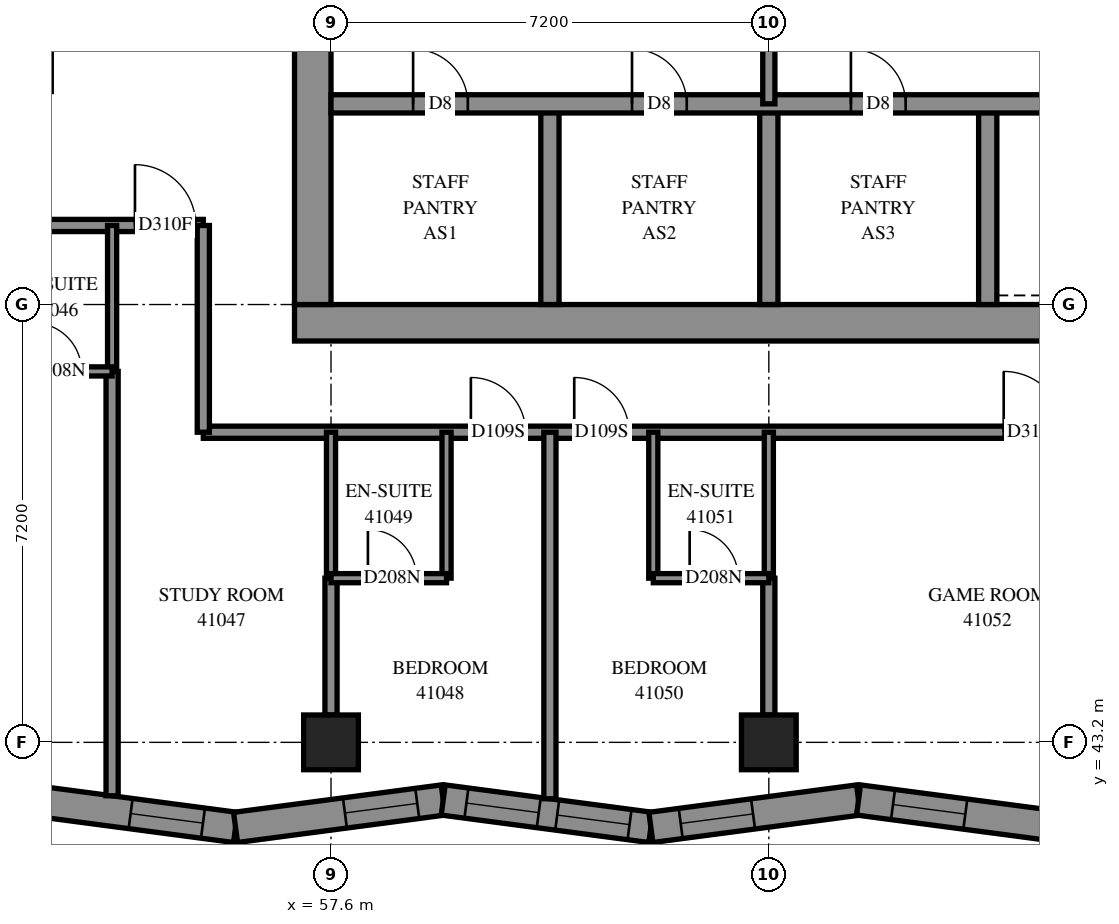
"""IFC4 building model, lengths in metres.
Left out: names, types, materials, properties, quantities, classifications, styles, units other than length and angle.
Written with IfcOpenShell. Run it as: python <this file> out.ifc"""

import sys

from ifc_helpers import new_model, si_unit, direction, frame, frame_2d, origin, origin_2d, place, context, subcontext, project, spatial, polyline, rectangle, outline, extrude, element, fill, save


model = new_model("IFC4")
c1 = context("Model", 3, precision=1e-05, world=origin(), true_north=direction((0.0, 1.0)))
c2 = subcontext(c1, "Body", "Model", "MODEL_VIEW")
j1 = project(units=[si_unit("LENGTHUNIT", "METRE"), si_unit("PLANEANGLEUNIT", "RADIAN")], contexts=[c1])
p1 = place(None, origin())
s1 = spatial("IfcSite", under=j1, at=p1, CompositionType="ELEMENT")
p2 = place(p1, origin())
s2 = spatial("IfcBuilding", under=s1, at=p2, CompositionType="ELEMENT")
p3 = place(p2, frame((0.0, 0.0, 152.4)))
s3 = spatial("IfcBuildingStorey", under=s2, at=p3, CompositionType="ELEMENT", Elevation=152.4)
for number, where, z_axis, x_axis in (
    (1, (57.6, 43.2, 0.0), (0.0, 0.0, 1.0), (1.0, 0.0, 0.0)),
    (2, (64.8, 43.2, 0.0), (0.0, 0.0, 1.0), (1.0, 0.0, 0.0)),
):
    element("IfcColumn", number, at=place(p3, frame(where, z_axis=z_axis, x_axis=x_axis)), inside=s3, PredefinedType="COLUMN", context=c2, shape_type="SweptSolid", body=[
        extrude(rectangle(XDim=0.9, YDim=0.9, at=origin_2d()), origin(), (0.0, 0.0, 1.0), 3.1),
    ])
p4 = place(p3, frame((57.0, 50.1, -0.3), z_axis=(0.0, 0.0, 1.0), x_axis=(1.0, 0.0, 0.0)))
e3 = element("IfcWall", 3, at=p4, inside=s3, PredefinedType="SHEAR", context=c2, shape_type="SweptSolid", body=[
    extrude(rectangle(XDim=15.6, YDim=0.6, at=frame_2d((7.8, 0.0))), origin(), (0.0, 0.0, 1.0), 2.7),
])
p5 = place(p3, frame((57.3, 50.4, -0.3), z_axis=(0.0, 0.0, 1.0), x_axis=(0.0, 1.0, 0.0)))
e4 = element("IfcWall", 4, at=p5, inside=s3, PredefinedType="SHEAR", context=c2, shape_type="SweptSolid", body=[
    extrude(rectangle(XDim=14.4, YDim=0.6, at=frame_2d((7.2, 0.0))), origin(), (0.0, 0.0, 1.0), 2.7),
])
p6 = place(p5, frame((4.55, 0.0, 0.3)))
e5 = element("IfcOpeningElement", 5, at=p6, cuts=e4, PredefinedType="OPENING", context=c2, shape_type="SweptSolid", body=[
    extrude(rectangle(XDim=1.1, YDim=2.1, at=frame_2d((0.55, 1.05))), frame((0.0, 0.31, 0.0), z_axis=(0.0, -1.0, 0.0), x_axis=(1.0, 0.0, 0.0)), (0.0, 0.0, 1.0), 0.62),
])
p7 = place(p5, frame((11.35, 0.0, 0.3)))
e6 = element("IfcOpeningElement", 6, at=p7, cuts=e4, PredefinedType="OPENING", context=c2, shape_type="SweptSolid", body=[
    extrude(rectangle(XDim=1.1, YDim=2.1, at=frame_2d((0.55, 1.05))), frame((0.0, 0.31, 0.0), z_axis=(0.0, -1.0, 0.0), x_axis=(1.0, 0.0, 0.0)), (0.0, 0.0, 1.0), 0.62),
])
for number, where, z_axis, x_axis in (
    (7, (61.2, 50.4, 0.0), (0.0, 0.0, 1.0), (0.0, 1.0, 0.0)),
    (8, (64.8, 50.4, 0.0), (0.0, 0.0, 1.0), (0.0, 1.0, 0.0)),
    (9, (68.4, 50.4, 0.0), (0.0, 0.0, 1.0), (0.0, 1.0, 0.0)),
):
    element("IfcWall", number, at=place(p3, frame(where, z_axis=z_axis, x_axis=x_axis)), inside=s3, PredefinedType="SOLIDWALL", context=c2, shape_type="SweptSolid", body=[
        extrude(rectangle(XDim=3.3, YDim=0.3, at=frame_2d((1.65, 0.0))), origin(), (0.0, 0.0, 1.0), 3.1),
    ])
p8 = place(p3, frame((57.6, 53.7, 0.0), z_axis=(0.0, 0.0, 1.0), x_axis=(1.0, 0.0, 0.0)))
e10 = element("IfcWall", 10, at=p8, inside=s3, PredefinedType="SOLIDWALL", context=c2, shape_type="SweptSolid", body=[
    extrude(rectangle(XDim=14.4, YDim=0.3, at=frame_2d((7.2, 0.0))), origin(), (0.0, 0.0, 1.0), 3.1),
])
p9 = place(p8, frame((1.35, 0.0, 0.0)))
e11 = element("IfcOpeningElement", 11, at=p9, cuts=e10, PredefinedType="OPENING", context=c2, shape_type="SweptSolid", body=[
    extrude(rectangle(XDim=0.9, YDim=2.1, at=frame_2d((0.45, 1.05))), frame((0.0, 0.16, 0.0), z_axis=(0.0, -1.0, 0.0), x_axis=(1.0, 0.0, 0.0)), (0.0, 0.0, 1.0), 0.32),
])
p10 = place(p8, frame((4.95, 0.0, 0.0)))
e12 = element("IfcOpeningElement", 12, at=p10, cuts=e10, PredefinedType="OPENING", context=c2, shape_type="SweptSolid", body=[
    extrude(rectangle(XDim=0.9, YDim=2.1, at=frame_2d((0.45, 1.05))), frame((0.0, 0.16, 0.0), z_axis=(0.0, -1.0, 0.0), x_axis=(1.0, 0.0, 0.0)), (0.0, 0.0, 1.0), 0.32),
])
p11 = place(p8, frame((8.55, 0.0, 0.0)))
e13 = element("IfcOpeningElement", 13, at=p11, cuts=e10, PredefinedType="OPENING", context=c2, shape_type="SweptSolid", body=[
    extrude(rectangle(XDim=0.9, YDim=2.1, at=frame_2d((0.45, 1.05))), frame((0.0, 0.16, 0.0), z_axis=(0.0, -1.0, 0.0), x_axis=(1.0, 0.0, 0.0)), (0.0, 0.0, 1.0), 0.32),
])
p12 = place(p8, frame((12.05, 0.0, 0.0)))
e14 = element("IfcOpeningElement", 14, at=p12, cuts=e10, PredefinedType="OPENING", context=c2, shape_type="SweptSolid", body=[
    extrude(rectangle(XDim=1.1, YDim=2.1, at=frame_2d((0.55, 1.05))), frame((0.0, 0.16, 0.0), z_axis=(0.0, -1.0, 0.0), x_axis=(1.0, 0.0, 0.0)), (0.0, 0.0, 1.0), 0.32),
])
p13 = place(p3, frame((52.594, 42.255, 0.0), z_axis=(0.0, 0.0, 1.0), x_axis=(0.9913929124, -0.1309201792, 0.0)))
e15 = element("IfcWall", 15, at=p13, inside=s3, PredefinedType="SOLIDWALL", context=c2, shape_type="SweptSolid", body=[
    extrude(outline(polyline([(0.055, -0.25), (3.499, -0.25), (3.433, 0.25), (-0.055, 0.25), (0.055, -0.25)])), origin(), (0.0, 0.0, 1.0), 3.1),
])
p14 = place(p13, frame((1.726, 0.0, 0.45)))
e16 = element("IfcOpeningElement", 16, at=p14, cuts=e15, PredefinedType="OPENING", context=c2, shape_type="SweptSolid", body=[
    extrude(rectangle(XDim=1.2, YDim=2.5, at=frame_2d((0.6, 1.25))), frame((0.0, 0.26, 0.0), z_axis=(0.0, -1.0, 0.0), x_axis=(1.0, 0.0, 0.0)), (0.0, 0.0, 1.0), 0.52),
])
p15 = place(p3, frame((56.03, 41.801, 0.0), z_axis=(0.0, 0.0, 1.0), x_axis=(0.9913924297, 0.1309238341, 0.0)))
e17 = element("IfcWall", 17, at=p15, inside=s3, PredefinedType="SOLIDWALL", context=c2, shape_type="SweptSolid", body=[
    extrude(outline(polyline([(-0.033, -0.25), (3.412, -0.25), (3.478, 0.25), (0.033, 0.25), (-0.033, -0.25)])), origin(), (0.0, 0.0, 1.0), 3.1),
])
p16 = place(p15, frame((1.814, 0.0, 0.45)))
e18 = element("IfcOpeningElement", 18, at=p16, cuts=e17, PredefinedType="OPENING", context=c2, shape_type="SweptSolid", body=[
    extrude(rectangle(XDim=1.2, YDim=2.5, at=frame_2d((0.6, 1.25))), frame((0.0, 0.26, 0.0), z_axis=(0.0, -1.0, 0.0), x_axis=(1.0, 0.0, 0.0)), (0.0, 0.0, 1.0), 0.52),
])
p17 = place(p3, frame((59.445, 42.252, 0.0), z_axis=(0.0, 0.0, 1.0), x_axis=(0.9913924297, -0.1309238341, 0.0)))
e19 = element("IfcWall", 19, at=p17, inside=s3, PredefinedType="SOLIDWALL", context=c2, shape_type="SweptSolid", body=[
    extrude(outline(polyline([(0.033, -0.25), (3.478, -0.25), (3.412, 0.25), (-0.033, 0.25), (0.033, -0.25)])), origin(), (0.0, 0.0, 1.0), 3.1),
])
p18 = place(p17, frame((0.385, 0.0, 0.45)))
e20 = element("IfcOpeningElement", 20, at=p18, cuts=e19, PredefinedType="OPENING", context=c2, shape_type="SweptSolid", body=[
    extrude(rectangle(XDim=1.2, YDim=2.5, at=frame_2d((0.6, 1.25))), frame((0.0, 0.26, 0.0), z_axis=(0.0, -1.0, 0.0), x_axis=(1.0, 0.0, 0.0)), (0.0, 0.0, 1.0), 0.52),
])
p19 = place(p17, frame((1.891, 0.0, 0.45)))
e21 = element("IfcOpeningElement", 21, at=p19, cuts=e19, PredefinedType="OPENING", context=c2, shape_type="SweptSolid", body=[
    extrude(rectangle(XDim=1.2, YDim=2.5, at=frame_2d((0.6, 1.25))), frame((0.0, 0.26, 0.0), z_axis=(0.0, -1.0, 0.0), x_axis=(1.0, 0.0, 0.0)), (0.0, 0.0, 1.0), 0.52),
])
p20 = place(p3, frame((62.86, 41.801, 0.0), z_axis=(0.0, 0.0, 1.0), x_axis=(0.9913924297, 0.1309238341, 0.0)))
e22 = element("IfcWall", 22, at=p20, inside=s3, PredefinedType="SOLIDWALL", context=c2, shape_type="SweptSolid", body=[
    extrude(outline(polyline([(-0.033, -0.25), (3.412, -0.25), (3.478, 0.25), (0.033, 0.25), (-0.033, -0.25)])), origin(), (0.0, 0.0, 1.0), 3.1),
])
p21 = place(p20, frame((0.495, 0.0, 0.45)))
e23 = element("IfcOpeningElement", 23, at=p21, cuts=e22, PredefinedType="OPENING", context=c2, shape_type="SweptSolid", body=[
    extrude(rectangle(XDim=1.2, YDim=2.5, at=frame_2d((0.6, 1.25))), frame((0.0, 0.26, 0.0), z_axis=(0.0, -1.0, 0.0), x_axis=(1.0, 0.0, 0.0)), (0.0, 0.0, 1.0), 0.52),
])
p22 = place(p3, frame((66.275, 42.252, 0.0), z_axis=(0.0, 0.0, 1.0), x_axis=(0.9913919321, -0.1309276022, 0.0)))
e24 = element("IfcWall", 24, at=p22, inside=s3, PredefinedType="SOLIDWALL", context=c2, shape_type="SweptSolid", body=[
    extrude(outline(polyline([(0.033, -0.25), (3.478, -0.25), (3.412, 0.25), (-0.033, 0.25), (0.033, -0.25)])), origin(), (0.0, 0.0, 1.0), 3.1),
])
p23 = place(p22, frame((0.572, 0.0, 0.45)))
e25 = element("IfcOpeningElement", 25, at=p23, cuts=e24, PredefinedType="OPENING", context=c2, shape_type="SweptSolid", body=[
    extrude(rectangle(XDim=1.2, YDim=2.5, at=frame_2d((0.6, 1.25))), frame((0.0, 0.26, 0.0), z_axis=(0.0, -1.0, 0.0), x_axis=(1.0, 0.0, 0.0)), (0.0, 0.0, 1.0), 0.52),
])
p24 = place(p3, frame((64.8, 53.7, 0.0), z_axis=(0.0, 0.0, 1.0), x_axis=(0.0, 1.0, 0.0)))
e26 = element("IfcWall", 26, at=p24, inside=s3, PredefinedType="PARTITIONING", context=c2, shape_type="SweptSolid", body=[
    extrude(rectangle(XDim=3.6, YDim=0.2, at=frame_2d((1.8, 0.0))), origin(), (0.0, 0.0, 1.0), 3.1),
])
p25 = place(p3, frame((55.5, 48.3, 0.0), z_axis=(0.0, 0.0, 1.0), x_axis=(1.0, 0.0, 0.0)))
e27 = element("IfcWall", 27, at=p25, inside=s3, PredefinedType="PARTITIONING", context=c2, shape_type="SweptSolid", body=[
    extrude(rectangle(XDim=18.974, YDim=0.2, at=frame_2d((9.487, 0.0))), origin(), (0.0, 0.0, 1.0), 3.1),
])
p26 = place(p25, frame((4.4, 0.0, 0.0)))
e28 = element("IfcOpeningElement", 28, at=p26, cuts=e27, PredefinedType="OPENING", context=c2, shape_type="SweptSolid", body=[
    extrude(rectangle(XDim=0.9, YDim=2.1, at=frame_2d((0.45, 1.05))), frame((0.0, 0.11, 0.0), z_axis=(0.0, -1.0, 0.0), x_axis=(1.0, 0.0, 0.0)), (0.0, 0.0, 1.0), 0.22),
])
p27 = place(p25, frame((6.1, 0.0, 0.0)))
e29 = element("IfcOpeningElement", 29, at=p27, cuts=e27, PredefinedType="OPENING", context=c2, shape_type="SweptSolid", body=[
    extrude(rectangle(XDim=0.9, YDim=2.1, at=frame_2d((0.45, 1.05))), frame((0.0, 0.11, 0.0), z_axis=(0.0, -1.0, 0.0), x_axis=(1.0, 0.0, 0.0)), (0.0, 0.0, 1.0), 0.22),
])
p28 = place(p25, frame((13.162, 0.0, 0.0)))
e30 = element("IfcOpeningElement", 30, at=p28, cuts=e27, PredefinedType="OPENING", context=c2, shape_type="SweptSolid", body=[
    extrude(rectangle(XDim=1.0, YDim=2.1, at=frame_2d((0.5, 1.05))), frame((0.0, 0.11, 0.0), z_axis=(0.0, -1.0, 0.0), x_axis=(1.0, 0.0, 0.0)), (0.0, 0.0, 1.0), 0.22),
])
p29 = place(p3, frame((54.0, 42.321, 0.0), z_axis=(0.0, 0.0, 1.0), x_axis=(0.0, 1.0, 0.0)))
e31 = element("IfcWall", 31, at=p29, inside=s3, PredefinedType="PARTITIONING", context=c2, shape_type="SweptSolid", body=[
    extrude(rectangle(XDim=6.979, YDim=0.2, at=frame_2d((3.489, 0.0))), origin(), (0.0, 0.0, 1.0), 3.1),
])
p30 = place(p3, frame((61.2, 42.273, 0.0), z_axis=(0.0, 0.0, 1.0), x_axis=(0.0, 1.0, 0.0)))
e32 = element("IfcWall", 32, at=p30, inside=s3, PredefinedType="PARTITIONING", context=c2, shape_type="SweptSolid", body=[
    extrude(rectangle(XDim=6.027, YDim=0.2, at=frame_2d((3.014, 0.0))), origin(), (0.0, 0.0, 1.0), 3.1),
])
p31 = place(p3, frame((50.4, 51.7, 0.0), z_axis=(0.0, 0.0, 1.0), x_axis=(1.0, 0.0, 0.0)))
e33 = element("IfcWall", 33, at=p31, inside=s3, PredefinedType="PARTITIONING", context=c2, shape_type="SweptSolid", body=[
    extrude(rectangle(XDim=5.1, YDim=0.2, at=frame_2d((2.55, 0.0))), origin(), (0.0, 0.0, 1.0), 3.1),
])
p32 = place(p31, frame((0.552, 0.0, 0.0)))
e34 = element("IfcOpeningElement", 34, at=p32, cuts=e33, PredefinedType="OPENING", context=c2, shape_type="SweptSolid", body=[
    extrude(rectangle(XDim=0.9, YDim=2.1, at=frame_2d((0.45, 1.05))), frame((0.0, 0.11, 0.0), z_axis=(0.0, -1.0, 0.0), x_axis=(1.0, 0.0, 0.0)), (0.0, 0.0, 1.0), 0.22),
])
p33 = place(p31, frame((3.976, 0.0, 0.0)))
e35 = element("IfcOpeningElement", 35, at=p33, cuts=e33, PredefinedType="OPENING", context=c2, shape_type="SweptSolid", body=[
    extrude(rectangle(XDim=1.0, YDim=2.1, at=frame_2d((0.5, 1.05))), frame((0.0, 0.11, 0.0), z_axis=(0.0, -1.0, 0.0), x_axis=(1.0, 0.0, 0.0)), (0.0, 0.0, 1.0), 0.22),
])
p34 = place(p3, frame((55.5, 48.3, 0.0), z_axis=(0.0, 0.0, 1.0), x_axis=(0.0, 1.0, 0.0)))
e36 = element("IfcWall", 36, at=p34, inside=s3, PredefinedType="PARTITIONING", context=c2, shape_type="SweptSolid", body=[
    extrude(rectangle(XDim=3.4, YDim=0.2, at=frame_2d((1.7, 0.0))), origin(), (0.0, 0.0, 1.0), 3.1),
])
for number, where, z_axis, x_axis in (
    (37, (54.0, 49.3, 0.0), (0.0, 0.0, 1.0), (0.0, 1.0, 0.0)),
    (38, (59.5, 45.9, 0.0), (0.0, 0.0, 1.0), (0.0, 1.0, 0.0)),
    (39, (57.6, 45.9, 0.0), (0.0, 0.0, 1.0), (0.0, 1.0, 0.0)),
    (40, (62.9, 45.9, 0.0), (0.0, 0.0, 1.0), (0.0, 1.0, 0.0)),
    (41, (64.8, 45.9, 0.0), (0.0, 0.0, 1.0), (0.0, 1.0, 0.0)),
):
    element("IfcWall", number, at=place(p3, frame(where, z_axis=z_axis, x_axis=x_axis)), inside=s3, PredefinedType="PARTITIONING", context=c2, shape_type="SweptSolid", body=[
        extrude(rectangle(XDim=2.4, YDim=0.15, at=frame_2d((1.2, 0.0))), origin(), (0.0, 0.0, 1.0), 3.1),
    ])
for number, where, z_axis, x_axis in (
    (42, (57.6, 43.65, 0.0), (0.0, 0.0, 1.0), (0.0, 1.0, 0.0)),
    (43, (64.8, 43.65, 0.0), (0.0, 0.0, 1.0), (0.0, 1.0, 0.0)),
):
    element("IfcWall", number, at=place(p3, frame(where, z_axis=z_axis, x_axis=x_axis)), inside=s3, PredefinedType="PARTITIONING", context=c2, shape_type="SweptSolid", body=[
        extrude(rectangle(XDim=2.25, YDim=0.2, at=frame_2d((1.125, 0.0))), origin(), (0.0, 0.0, 1.0), 3.1),
    ])
p35 = place(p3, frame((52.1, 49.3, 0.0), z_axis=(0.0, 0.0, 1.0), x_axis=(1.0, 0.0, 0.0)))
e44 = element("IfcWall", 44, at=p35, inside=s3, PredefinedType="PARTITIONING", context=c2, shape_type="SweptSolid", body=[
    extrude(rectangle(XDim=1.9, YDim=0.15, at=frame_2d((0.95, 0.0))), origin(), (0.0, 0.0, 1.0), 3.1),
])
p36 = place(p35, frame((0.598, 0.0, 0.0)))
e45 = element("IfcOpeningElement", 45, at=p36, cuts=e44, PredefinedType="OPENING", context=c2, shape_type="SweptSolid", body=[
    extrude(rectangle(XDim=0.8, YDim=2.1, at=frame_2d((0.4, 1.05))), frame((0.0, 0.085, 0.0), z_axis=(0.0, -1.0, 0.0), x_axis=(1.0, 0.0, 0.0)), (0.0, 0.0, 1.0), 0.17),
])
p37 = place(p3, frame((57.6, 45.9, 0.0), z_axis=(0.0, 0.0, 1.0), x_axis=(1.0, 0.0, 0.0)))
e46 = element("IfcWall", 46, at=p37, inside=s3, PredefinedType="PARTITIONING", context=c2, shape_type="SweptSolid", body=[
    extrude(rectangle(XDim=1.9, YDim=0.15, at=frame_2d((0.95, 0.0))), origin(), (0.0, 0.0, 1.0), 3.1),
])
p38 = place(p37, frame((0.607, 0.0, 0.0)))
e47 = element("IfcOpeningElement", 47, at=p38, cuts=e46, PredefinedType="OPENING", context=c2, shape_type="SweptSolid", body=[
    extrude(rectangle(XDim=0.8, YDim=2.1, at=frame_2d((0.4, 1.05))), frame((0.0, 0.085, 0.0), z_axis=(0.0, -1.0, 0.0), x_axis=(1.0, 0.0, 0.0)), (0.0, 0.0, 1.0), 0.17),
])
p39 = place(p3, frame((62.9, 45.9, 0.0), z_axis=(0.0, 0.0, 1.0), x_axis=(1.0, 0.0, 0.0)))
e48 = element("IfcWall", 48, at=p39, inside=s3, PredefinedType="PARTITIONING", context=c2, shape_type="SweptSolid", body=[
    extrude(rectangle(XDim=1.9, YDim=0.15, at=frame_2d((0.95, 0.0))), origin(), (0.0, 0.0, 1.0), 3.1),
])
p40 = place(p39, frame((0.598, 0.0, 0.0)))
e49 = element("IfcOpeningElement", 49, at=p40, cuts=e48, PredefinedType="OPENING", context=c2, shape_type="SweptSolid", body=[
    extrude(rectangle(XDim=0.8, YDim=2.1, at=frame_2d((0.4, 1.05))), frame((0.0, 0.085, 0.0), z_axis=(0.0, -1.0, 0.0), x_axis=(1.0, 0.0, 0.0)), (0.0, 0.0, 1.0), 0.17),
])
p41 = place(p14, origin())
e50 = element("IfcWindow", 50, at=p41, inside=s3, PartitioningType="SINGLE_PANEL", PredefinedType="WINDOW", context=c2, shape_type="SweptSolid", body=[
    extrude(rectangle(XDim=1.2, YDim=2.5, at=frame_2d((0.6, 1.25))), frame((0.0, 0.18, 0.0), z_axis=(0.0, -1.0, 0.0), x_axis=(1.0, 0.0, 0.0)), (0.0, 0.0, 1.0), 0.06),
])
fill(e16, e50)
p42 = place(p16, origin())
e51 = element("IfcWindow", 51, at=p42, inside=s3, PartitioningType="SINGLE_PANEL", PredefinedType="WINDOW", context=c2, shape_type="SweptSolid", body=[
    extrude(rectangle(XDim=1.2, YDim=2.5, at=frame_2d((0.6, 1.25))), frame((0.0, 0.18, 0.0), z_axis=(0.0, -1.0, 0.0), x_axis=(1.0, 0.0, 0.0)), (0.0, 0.0, 1.0), 0.06),
])
fill(e18, e51)
p43 = place(p18, origin())
e52 = element("IfcWindow", 52, at=p43, inside=s3, PartitioningType="SINGLE_PANEL", PredefinedType="WINDOW", context=c2, shape_type="SweptSolid", body=[
    extrude(rectangle(XDim=1.2, YDim=2.5, at=frame_2d((0.6, 1.25))), frame((0.0, 0.18, 0.0), z_axis=(0.0, -1.0, 0.0), x_axis=(1.0, 0.0, 0.0)), (0.0, 0.0, 1.0), 0.06),
])
fill(e20, e52)
p44 = place(p19, origin())
e53 = element("IfcWindow", 53, at=p44, inside=s3, PartitioningType="SINGLE_PANEL", PredefinedType="WINDOW", context=c2, shape_type="SweptSolid", body=[
    extrude(rectangle(XDim=1.2, YDim=2.5, at=frame_2d((0.6, 1.25))), frame((0.0, 0.18, 0.0), z_axis=(0.0, -1.0, 0.0), x_axis=(1.0, 0.0, 0.0)), (0.0, 0.0, 1.0), 0.06),
])
fill(e21, e53)
p45 = place(p21, origin())
e54 = element("IfcWindow", 54, at=p45, inside=s3, PartitioningType="SINGLE_PANEL", PredefinedType="WINDOW", context=c2, shape_type="SweptSolid", body=[
    extrude(rectangle(XDim=1.2, YDim=2.5, at=frame_2d((0.6, 1.25))), frame((0.0, 0.18, 0.0), z_axis=(0.0, -1.0, 0.0), x_axis=(1.0, 0.0, 0.0)), (0.0, 0.0, 1.0), 0.06),
])
fill(e23, e54)
p46 = place(p23, origin())
e55 = element("IfcWindow", 55, at=p46, inside=s3, PartitioningType="SINGLE_PANEL", PredefinedType="WINDOW", context=c2, shape_type="SweptSolid", body=[
    extrude(rectangle(XDim=1.2, YDim=2.5, at=frame_2d((0.6, 1.25))), frame((0.0, 0.18, 0.0), z_axis=(0.0, -1.0, 0.0), x_axis=(1.0, 0.0, 0.0)), (0.0, 0.0, 1.0), 0.06),
])
fill(e25, e55)
p47 = place(p9, origin())
e56 = element("IfcDoor", 56, at=p47, inside=s3, OperationType="SINGLE_SWING_LEFT", PredefinedType="DOOR", context=c2, shape_type="SweptSolid", body=[
    extrude(rectangle(XDim=0.9, YDim=2.1, at=frame_2d((0.45, 1.05))), frame((0.0, 0.025, 0.0), z_axis=(0.0, -1.0, 0.0), x_axis=(1.0, 0.0, 0.0)), (0.0, 0.0, 1.0), 0.05),
])
fill(e11, e56)
p48 = place(p10, origin())
e57 = element("IfcDoor", 57, at=p48, inside=s3, OperationType="SINGLE_SWING_LEFT", PredefinedType="DOOR", context=c2, shape_type="SweptSolid", body=[
    extrude(rectangle(XDim=0.9, YDim=2.1, at=frame_2d((0.45, 1.05))), frame((0.0, 0.025, 0.0), z_axis=(0.0, -1.0, 0.0), x_axis=(1.0, 0.0, 0.0)), (0.0, 0.0, 1.0), 0.05),
])
fill(e12, e57)
p49 = place(p11, origin())
e58 = element("IfcDoor", 58, at=p49, inside=s3, OperationType="SINGLE_SWING_LEFT", PredefinedType="DOOR", context=c2, shape_type="SweptSolid", body=[
    extrude(rectangle(XDim=0.9, YDim=2.1, at=frame_2d((0.45, 1.05))), frame((0.0, 0.025, 0.0), z_axis=(0.0, -1.0, 0.0), x_axis=(1.0, 0.0, 0.0)), (0.0, 0.0, 1.0), 0.05),
])
fill(e13, e58)
p50 = place(p36, origin())
e59 = element("IfcDoor", 59, at=p50, inside=s3, OperationType="SINGLE_SWING_RIGHT", PredefinedType="DOOR", context=c2, shape_type="SweptSolid", body=[
    extrude(rectangle(XDim=0.8, YDim=2.1, at=frame_2d((0.4, 1.05))), frame((0.0, 0.025, 0.0), z_axis=(0.0, -1.0, 0.0), x_axis=(1.0, 0.0, 0.0)), (0.0, 0.0, 1.0), 0.05),
])
fill(e45, e59)
p51 = place(p33, origin())
e60 = element("IfcDoor", 60, at=p51, inside=s3, OperationType="SINGLE_SWING_RIGHT", PredefinedType="DOOR", context=c2, shape_type="SweptSolid", body=[
    extrude(rectangle(XDim=1.0, YDim=2.1, at=frame_2d((0.5, 1.05))), frame((0.0, 0.025, 0.0), z_axis=(0.0, -1.0, 0.0), x_axis=(1.0, 0.0, 0.0)), (0.0, 0.0, 1.0), 0.05),
])
fill(e35, e60)
p52 = place(p26, origin())
e61 = element("IfcDoor", 61, at=p52, inside=s3, OperationType="SINGLE_SWING_LEFT", PredefinedType="DOOR", context=c2, shape_type="SweptSolid", body=[
    extrude(rectangle(XDim=0.9, YDim=2.1, at=frame_2d((0.45, 1.05))), frame((0.0, 0.025, 0.0), z_axis=(0.0, -1.0, 0.0), x_axis=(1.0, 0.0, 0.0)), (0.0, 0.0, 1.0), 0.05),
])
fill(e28, e61)
p53 = place(p38, origin())
e62 = element("IfcDoor", 62, at=p53, inside=s3, OperationType="SINGLE_SWING_RIGHT", PredefinedType="DOOR", context=c2, shape_type="SweptSolid", body=[
    extrude(rectangle(XDim=0.8, YDim=2.1, at=frame_2d((0.4, 1.05))), frame((0.0, 0.025, 0.0), z_axis=(0.0, -1.0, 0.0), x_axis=(1.0, 0.0, 0.0)), (0.0, 0.0, 1.0), 0.05),
])
fill(e47, e62)
p54 = place(p27, origin())
e63 = element("IfcDoor", 63, at=p54, inside=s3, OperationType="SINGLE_SWING_RIGHT", PredefinedType="DOOR", context=c2, shape_type="SweptSolid", body=[
    extrude(rectangle(XDim=0.9, YDim=2.1, at=frame_2d((0.45, 1.05))), frame((0.0, 0.025, 0.0), z_axis=(0.0, -1.0, 0.0), x_axis=(1.0, 0.0, 0.0)), (0.0, 0.0, 1.0), 0.05),
])
fill(e29, e63)
p55 = place(p40, origin())
e64 = element("IfcDoor", 64, at=p55, inside=s3, OperationType="SINGLE_SWING_RIGHT", PredefinedType="DOOR", context=c2, shape_type="SweptSolid", body=[
    extrude(rectangle(XDim=0.8, YDim=2.1, at=frame_2d((0.4, 1.05))), frame((0.0, 0.025, 0.0), z_axis=(0.0, -1.0, 0.0), x_axis=(1.0, 0.0, 0.0)), (0.0, 0.0, 1.0), 0.05),
])
fill(e49, e64)
p56 = place(p28, origin())
e65 = element("IfcDoor", 65, at=p56, inside=s3, OperationType="SINGLE_SWING_LEFT", PredefinedType="DOOR", context=c2, shape_type="SweptSolid", body=[
    extrude(rectangle(XDim=1.0, YDim=2.1, at=frame_2d((0.5, 1.05))), frame((0.0, 0.025, 0.0), z_axis=(0.0, -1.0, 0.0), x_axis=(1.0, 0.0, 0.0)), (0.0, 0.0, 1.0), 0.05),
])
fill(e30, e65)
save(model, sys.argv[1])
